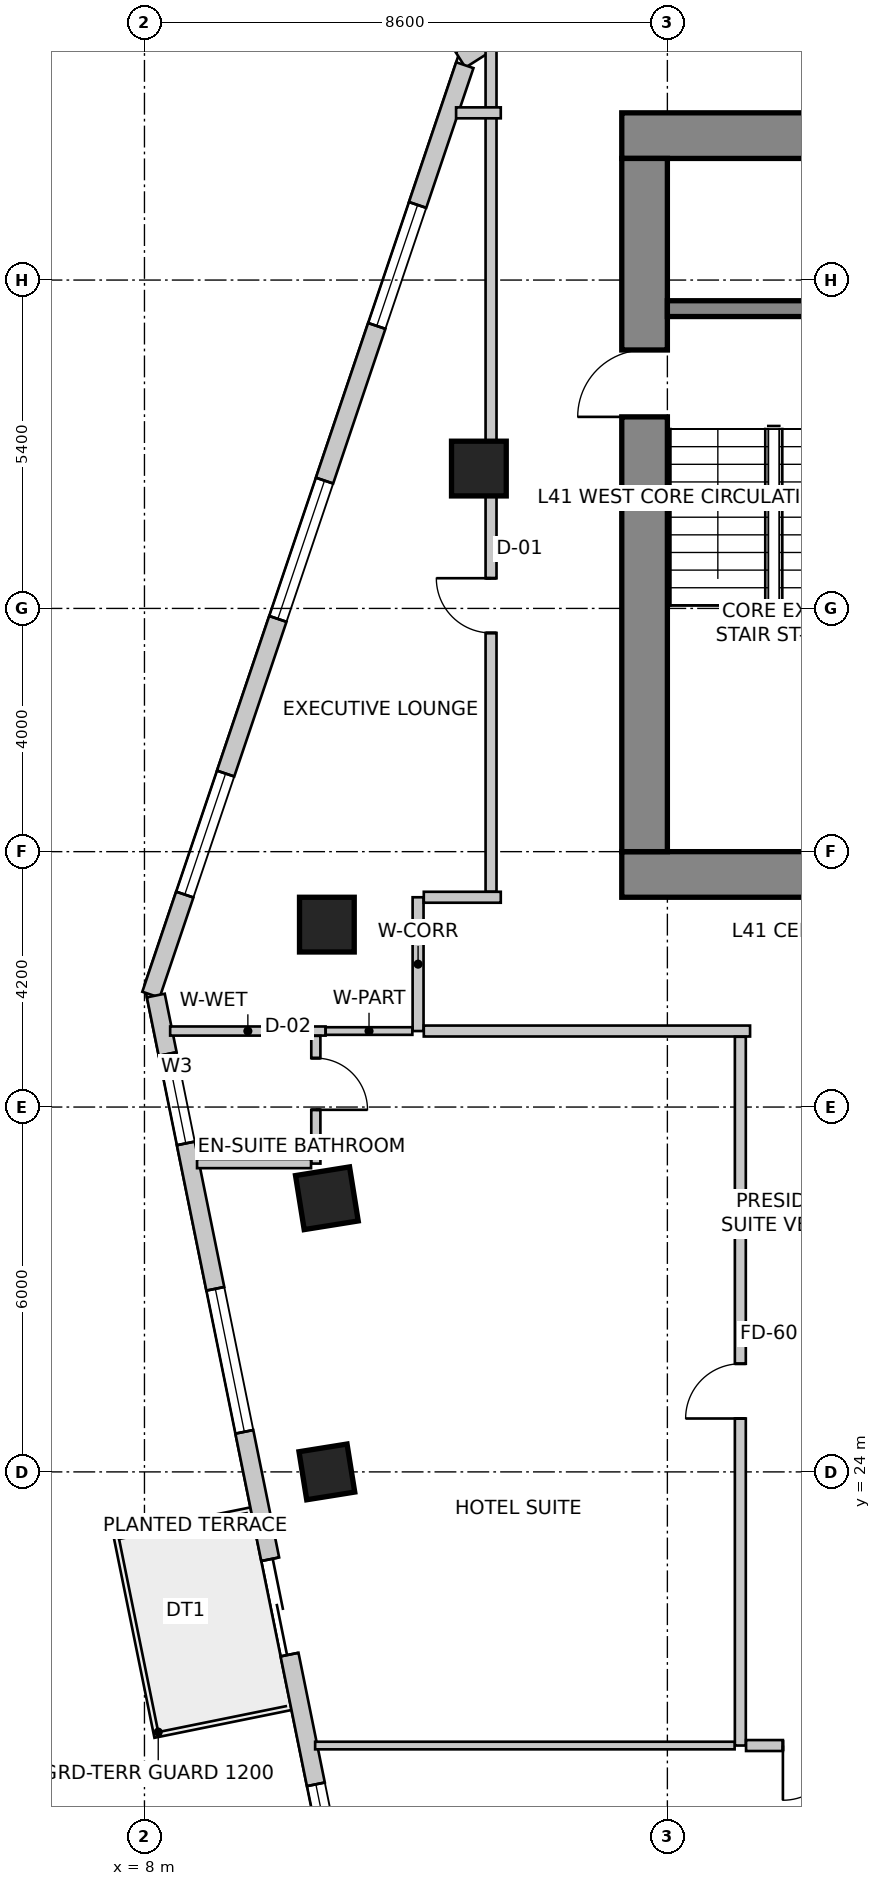
"""IFC4 building model, lengths in metres.
Left out: names, types, materials, properties, quantities, classifications, styles, units other than length and angle.
Written with IfcOpenShell. Run it as: python <this file> out.ifc"""

import sys

from ifc_helpers import new_model, si_unit, direction, frame, frame_2d, origin, origin_2d, place, context, subcontext, project, spatial, rectangle, extrude, source, transform, mapped, element, fill, save


model = new_model("IFC4")
c1 = context("Model", 3, precision=1e-05, world=origin(), true_north=direction((0.0, 1.0)))
c2 = subcontext(c1, "Body", "Model", "MODEL_VIEW")
j1 = project(units=[si_unit("LENGTHUNIT", "METRE"), si_unit("PLANEANGLEUNIT", "RADIAN")], contexts=[c1])
p1 = place(None, origin())
s1 = spatial("IfcSite", under=j1, at=p1, CompositionType="ELEMENT")
p2 = place(p1, origin())
s2 = spatial("IfcBuilding", under=s1, at=p2, CompositionType="ELEMENT")
p3 = place(p2, frame((0.0, 0.0, 164.6)))
s3 = spatial("IfcBuildingStorey", under=s2, at=p3, CompositionType="ELEMENT", Elevation=164.6)
p4 = place(p3, frame((15.85, 45.975, 0.0), z_axis=(0.0, 0.0, 1.0), x_axis=(1.0, 0.0, 0.0)))
e1 = element("IfcWall", 1, at=p4, inside=s3, PredefinedType="SHEAR", context=c2, shape_type="SweptSolid", body=[
    extrude(rectangle(XDim=15.9, YDim=0.75, at=frame_2d((7.95, 0.0))), origin(), (0.0, 0.0, 1.0), 3.6),
])
p5 = place(p3, frame((15.85, 33.825, 0.0), z_axis=(0.0, 0.0, 1.0), x_axis=(1.0, 0.0, 0.0)))
e2 = element("IfcWall", 2, at=p5, inside=s3, PredefinedType="SHEAR", context=c2, shape_type="SweptSolid", body=[
    extrude(rectangle(XDim=15.9, YDim=0.75, at=frame_2d((7.95, 0.0))), origin(), (0.0, 0.0, 1.0), 3.6),
])
m1 = source(origin(), c2, "Body", "SweptSolid", [
    extrude(rectangle(XDim=1.3, YDim=2.15, at=frame_2d((0.65, 1.075))), frame((0.0, 0.385, 0.0), z_axis=(0.0, -1.0, 0.0), x_axis=(1.0, 0.0, 0.0)), (0.0, 0.0, 1.0), 0.77),
])
p6 = place(p5, frame((10.08, 0.0, 0.0)))
e3 = element("IfcOpeningElement", 3, at=p6, cuts=e2, PredefinedType="OPENING", context=c2, shape_type="MappedRepresentation", body=[
    mapped(m1, transform((0.0, 0.0, 0.0), scale=1.0)),
])
p7 = place(p3, frame((16.225, 34.2, 0.0), z_axis=(0.0, 0.0, 1.0), x_axis=(0.0, 1.0, 0.0)))
e4 = element("IfcWall", 4, at=p7, inside=s3, PredefinedType="SHEAR", context=c2, shape_type="SweptSolid", body=[
    extrude(rectangle(XDim=11.4, YDim=0.75, at=frame_2d((5.7, 0.0))), origin(), (0.0, 0.0, 1.0), 3.6),
])
m2 = source(origin(), c2, "Body", "SweptSolid", [
    extrude(rectangle(XDim=1.1, YDim=2.15, at=frame_2d((0.55, 1.075))), frame((0.0, 0.385, 0.0), z_axis=(0.0, -1.0, 0.0), x_axis=(1.0, 0.0, 0.0)), (0.0, 0.0, 1.0), 0.77),
])
p8 = place(p7, frame((7.15, 0.0, 0.0)))
e5 = element("IfcOpeningElement", 5, at=p8, cuts=e4, PredefinedType="OPENING", context=c2, shape_type="MappedRepresentation", body=[
    mapped(m2, transform((0.0, 0.0, 0.0), scale=1.0)),
])
p9 = place(p3, frame((16.6, 43.13, 0.0), z_axis=(0.0, 0.0, 1.0), x_axis=(1.0, 0.0, 0.0)))
e6 = element("IfcWall", 6, at=p9, inside=s3, PredefinedType="SHEAR", context=c2, shape_type="SweptSolid", body=[
    extrude(rectangle(XDim=3.5, YDim=0.26, at=frame_2d((1.75, 0.0))), origin(), (0.0, 0.0, 1.0), 3.6),
])
m3 = source(origin(), c2, "Body", "SweptSolid", [
    extrude(rectangle(XDim=0.9, YDim=0.9, at=origin_2d()), origin(), (0.0, 0.0, 1.0), 3.6),
])
for number, where, z_axis, x_axis in (
    (7, (11.0, 33.0, 0.0), (0.0, 0.0, 1.0), (1.0, 0.0, 0.0)),
    (8, (13.5, 40.5, 0.0), (0.0, 0.0, 1.0), (1.0, 0.0, 0.0)),
    (9, (11.0, 28.5, 0.0), (0.0, 0.0, 1.0), (0.158, -0.987, 0.0)),
):
    element("IfcColumn", number, at=place(p3, frame(where, z_axis=z_axis, x_axis=x_axis)), inside=s3, PredefinedType="COLUMN", context=c2, shape_type="MappedRepresentation", body=[
        mapped(m3, transform((0.0, 0.0, 0.0), scale=1.0)),
    ])
m4 = source(origin(), c2, "Body", "SweptSolid", [
    extrude(rectangle(XDim=0.8, YDim=0.8, at=origin_2d()), origin(), (0.0, 0.0, 1.0), 3.6),
])
p10 = place(p3, frame((11.0, 24.0, 0.0), z_axis=(0.0, 0.0, 1.0), x_axis=(0.158158067254, -0.987413806751, 0.0)))
e10 = element("IfcColumn", 10, at=p10, inside=s3, PredefinedType="COLUMN", context=c2, shape_type="MappedRepresentation", body=[
    mapped(m4, transform((0.0, 0.0, 0.0), scale=1.0)),
])
p11 = place(p3, frame((21.875, 52.742, 0.0), z_axis=(0.0, 0.0, 1.0), x_axis=(-0.843662465249, -0.536873956092, 0.0)))
e11 = element("IfcWall", 11, at=p11, inside=s3, PredefinedType="SOLIDWALL", context=c2, shape_type="SweptSolid", body=[
    extrude(rectangle(XDim=10.284, YDim=0.3, at=frame_2d((5.142, 0.0))), origin(), (0.0, 0.0, 1.0), 3.35),
])
m5 = source(origin(), c2, "Body", "SweptSolid", [
    extrude(rectangle(XDim=2.4, YDim=2.2, at=frame_2d((1.2, 1.1))), frame((0.0, 0.16, 0.0), z_axis=(0.0, -1.0, 0.0), x_axis=(1.0, 0.0, 0.0)), (0.0, 0.0, 1.0), 0.32),
])
p12 = place(p11, frame((2.656, 0.0, 0.85)))
e12 = element("IfcOpeningElement", 12, at=p12, cuts=e11, PredefinedType="OPENING", context=c2, shape_type="MappedRepresentation", body=[
    mapped(m5, transform((0.0, 0.0, 0.0), scale=1.0)),
])
m6 = source(origin(), c2, "Body", "SweptSolid", [
    extrude(rectangle(XDim=1.5, YDim=1.8, at=frame_2d((0.75, 0.9))), frame((0.0, 0.16, 0.0), z_axis=(0.0, -1.0, 0.0), x_axis=(1.0, 0.0, 0.0)), (0.0, 0.0, 1.0), 0.32),
])
p13 = place(p11, frame((7.937, 0.0, 0.85)))
e13 = element("IfcOpeningElement", 13, at=p13, cuts=e11, PredefinedType="OPENING", context=c2, shape_type="MappedRepresentation", body=[
    mapped(m6, transform((0.0, 0.0, 0.0), scale=1.0)),
])
p14 = place(p3, frame((13.269, 47.134, 0.0), z_axis=(0.0, 0.0, 1.0), x_axis=(-0.319929773322, -0.947441259468, 0.0)))
e14 = element("IfcWall", 14, at=p14, inside=s3, PredefinedType="SOLIDWALL", context=c2, shape_type="SweptSolid", body=[
    extrude(rectangle(XDim=16.134, YDim=0.3, at=frame_2d((8.067, 0.0))), origin(), (0.0, 0.0, 1.0), 3.35),
])
m7 = source(origin(), c2, "Body", "SweptSolid", [
    extrude(rectangle(XDim=2.1, YDim=2.0, at=frame_2d((1.05, 1.0))), frame((0.0, 0.16, 0.0), z_axis=(0.0, -1.0, 0.0), x_axis=(1.0, 0.0, 0.0)), (0.0, 0.0, 1.0), 0.32),
])
p15 = place(p14, frame((2.426, 0.0, 0.85)))
e15 = element("IfcOpeningElement", 15, at=p15, cuts=e14, PredefinedType="OPENING", context=c2, shape_type="MappedRepresentation", body=[
    mapped(m7, transform((0.0, 0.0, 0.0), scale=1.0)),
])
p16 = place(p14, frame((7.211, 0.0, 0.85)))
e16 = element("IfcOpeningElement", 16, at=p16, cuts=e14, PredefinedType="OPENING", context=c2, shape_type="MappedRepresentation", body=[
    mapped(m5, transform((0.0, 0.0, 0.0), scale=1.0)),
])
p17 = place(p14, frame((12.296, 0.0, 0.85)))
e17 = element("IfcOpeningElement", 17, at=p17, cuts=e14, PredefinedType="OPENING", context=c2, shape_type="MappedRepresentation", body=[
    mapped(m7, transform((0.0, 0.0, 0.0), scale=1.0)),
])
p18 = place(p3, frame((8.187, 31.834, 0.0), z_axis=(0.0, 0.0, 1.0), x_axis=(0.198869838988, -0.980025911464, 0.0)))
e18 = element("IfcWall", 18, at=p18, inside=s3, PredefinedType="SOLIDWALL", context=c2, shape_type="SweptSolid", body=[
    extrude(rectangle(XDim=16.363, YDim=0.3, at=frame_2d((8.182, 0.0))), origin(), (0.0, 0.0, 1.0), 3.35),
])
m8 = source(origin(), c2, "Body", "SweptSolid", [
    extrude(rectangle(XDim=1.6, YDim=2.15, at=frame_2d((0.8, 1.075))), frame((0.0, 0.16, 0.0), z_axis=(0.0, -1.0, 0.0), x_axis=(1.0, 0.0, 0.0)), (0.0, 0.0, 1.0), 0.32),
])
p19 = place(p18, frame((9.459, 0.0, 0.0)))
e19 = element("IfcOpeningElement", 19, at=p19, cuts=e18, PredefinedType="OPENING", context=c2, shape_type="MappedRepresentation", body=[
    mapped(m8, transform((0.0, 0.0, 0.0), scale=1.0)),
])
p20 = place(p18, frame((0.981, 0.0, 0.85)))
e20 = element("IfcOpeningElement", 20, at=p20, cuts=e18, PredefinedType="OPENING", context=c2, shape_type="MappedRepresentation", body=[
    mapped(m6, transform((0.0, 0.0, 0.0), scale=1.0)),
])
p21 = place(p18, frame((4.921, 0.0, 0.85)))
e21 = element("IfcOpeningElement", 21, at=p21, cuts=e18, PredefinedType="OPENING", context=c2, shape_type="MappedRepresentation", body=[
    mapped(m5, transform((0.0, 0.0, 0.0), scale=1.0)),
])
p22 = place(p18, frame((13.236, 0.0, 0.85)))
e22 = element("IfcOpeningElement", 22, at=p22, cuts=e18, PredefinedType="OPENING", context=c2, shape_type="MappedRepresentation", body=[
    mapped(m5, transform((0.0, 0.0, 0.0), scale=1.0)),
])
p23 = place(p3, frame((12.5, 31.25, 0.0), z_axis=(0.0, 0.0, 1.0), x_axis=(0.0, 1.0, 0.0)))
e23 = element("IfcWall", 23, at=p23, inside=s3, PredefinedType="PARTITIONING", context=c2, shape_type="SweptSolid", body=[
    extrude(rectangle(XDim=2.2, YDim=0.18, at=frame_2d((1.1, 0.0))), origin(), (0.0, 0.0, 1.0), 3.034),
])
p24 = place(p3, frame((12.594, 33.45, 0.0), z_axis=(0.0, 0.0, 1.0), x_axis=(1.0, 0.0, 0.0)))
e24 = element("IfcWall", 24, at=p24, inside=s3, PredefinedType="PARTITIONING", context=c2, shape_type="SweptSolid", body=[
    extrude(rectangle(XDim=1.266, YDim=0.18, at=frame_2d((0.633, 0.0))), origin(), (0.0, 0.0, 1.0), 3.35),
])
p25 = place(p3, frame((17.96, 31.25, 0.0), z_axis=(0.0, 0.0, 1.0), x_axis=(-1.0, 0.0, 0.0)))
e25 = element("IfcWall", 25, at=p25, inside=s3, PredefinedType="PARTITIONING", context=c2, shape_type="SweptSolid", body=[
    extrude(rectangle(XDim=5.366, YDim=0.18, at=frame_2d((2.683, 0.0))), origin(), (0.0, 0.0, 1.0), 3.034),
])
p26 = place(p3, frame((13.7, 33.544, 0.0), z_axis=(0.0, 0.0, 1.0), x_axis=(0.0, 1.0, 0.0)))
e26 = element("IfcWall", 26, at=p26, inside=s3, PredefinedType="PARTITIONING", context=c2, shape_type="SweptSolid", body=[
    extrude(rectangle(XDim=13.86, YDim=0.18, at=frame_2d((6.93, 0.0))), origin(), (0.0, 0.0, 1.0), 2.492),
])
m9 = source(origin(), c2, "Body", "SweptSolid", [
    extrude(rectangle(XDim=0.9, YDim=2.15, at=frame_2d((0.45, 1.075))), frame((0.0, 0.1, 0.0), z_axis=(0.0, -1.0, 0.0), x_axis=(1.0, 0.0, 0.0)), (0.0, 0.0, 1.0), 0.2),
])
p27 = place(p26, frame((4.253, 0.0, 0.0)))
e27 = element("IfcOpeningElement", 27, at=p27, cuts=e26, PredefinedType="OPENING", context=c2, shape_type="MappedRepresentation", body=[
    mapped(m9, transform((0.0, 0.0, 0.0), scale=1.0)),
])
p28 = place(p3, frame((13.86, 46.35, 0.0), z_axis=(0.0, 0.0, 1.0), x_axis=(-1.0, 0.0, 0.0)))
e28 = element("IfcWall", 28, at=p28, inside=s3, PredefinedType="PARTITIONING", context=c2, shape_type="SweptSolid", body=[
    extrude(rectangle(XDim=0.735, YDim=0.18, at=frame_2d((0.367, 0.0))), origin(), (0.0, 0.0, 1.0), 3.35),
])
p29 = place(p3, frame((10.979, 31.25, 0.0), z_axis=(0.0, 0.0, 1.0), x_axis=(-1.0, 0.0, 0.0)))
e29 = element("IfcWall", 29, at=p29, inside=s3, PredefinedType="PARTITIONING", context=c2, shape_type="SweptSolid", body=[
    extrude(rectangle(XDim=2.556, YDim=0.15, at=frame_2d((1.278, 0.0))), origin(), (0.0, 0.0, 1.0), 2.492),
])
p30 = place(p3, frame((12.406, 31.25, 0.0), z_axis=(0.0, 0.0, 1.0), x_axis=(-1.0, 0.0, 0.0)))
e30 = element("IfcWall", 30, at=p30, inside=s3, PredefinedType="PARTITIONING", context=c2, shape_type="SweptSolid", body=[
    extrude(rectangle(XDim=1.426, YDim=0.125, at=frame_2d((0.713, 0.0))), origin(), (0.0, 0.0, 1.0), 2.492),
])
p31 = place(p3, frame((17.8, 19.5, 0.0), z_axis=(0.0, 0.0, 1.0), x_axis=(0.0, 1.0, 0.0)))
e31 = element("IfcWall", 31, at=p31, inside=s3, PredefinedType="PARTITIONING", context=c2, shape_type="SweptSolid", body=[
    extrude(rectangle(XDim=11.656, YDim=0.18, at=frame_2d((5.828, 0.0))), origin(), (0.0, 0.0, 1.0), 2.803),
])
p32 = place(p31, frame((5.378, 0.0, 0.0)))
e32 = element("IfcOpeningElement", 32, at=p32, cuts=e31, PredefinedType="OPENING", context=c2, shape_type="MappedRepresentation", body=[
    mapped(m9, transform((0.0, 0.0, 0.0), scale=1.0)),
])
p33 = place(p3, frame((20.006, 19.5, 0.0), z_axis=(0.0, 0.0, 1.0), x_axis=(-1.0, 0.0, 0.0)))
e33 = element("IfcWall", 33, at=p33, inside=s3, PredefinedType="PARTITIONING", context=c2, shape_type="SweptSolid", body=[
    extrude(rectangle(XDim=2.112, YDim=0.18, at=frame_2d((1.056, 0.0))), origin(), (0.0, 0.0, 1.0), 3.35),
])
p34 = place(p33, frame((0.606, 0.0, 0.0)))
e34 = element("IfcOpeningElement", 34, at=p34, cuts=e33, PredefinedType="OPENING", context=c2, shape_type="MappedRepresentation", body=[
    mapped(m9, transform((0.0, 0.0, 0.0), scale=1.0)),
])
p35 = place(p3, frame((10.819, 31.171, 0.0), z_axis=(0.0, 0.0, 1.0), x_axis=(0.0, -1.0, 0.0)))
e35 = element("IfcWall", 35, at=p35, inside=s3, PredefinedType="PARTITIONING", context=c2, shape_type="SweptSolid", body=[
    extrude(rectangle(XDim=2.101, YDim=0.15, at=frame_2d((1.05, 0.0))), origin(), (0.0, 0.0, 1.0), 2.492),
])
m10 = source(origin(), c2, "Body", "SweptSolid", [
    extrude(rectangle(XDim=0.85, YDim=2.15, at=frame_2d((0.425, 1.075))), frame((0.0, 0.085, 0.0), z_axis=(0.0, -1.0, 0.0), x_axis=(1.0, 0.0, 0.0)), (0.0, 0.0, 1.0), 0.17),
])
p36 = place(p35, frame((0.366, 0.0, 0.0)))
e36 = element("IfcOpeningElement", 36, at=p36, cuts=e35, PredefinedType="OPENING", context=c2, shape_type="MappedRepresentation", body=[
    mapped(m10, transform((0.0, 0.0, 0.0), scale=1.0)),
])
p37 = place(p3, frame((10.74, 29.07, 0.0), z_axis=(0.0, 0.0, 1.0), x_axis=(-1.0, 0.0, 0.0)))
e37 = element("IfcWall", 37, at=p37, inside=s3, PredefinedType="PARTITIONING", context=c2, shape_type="SweptSolid", body=[
    extrude(rectangle(XDim=1.875, YDim=0.15, at=frame_2d((0.937, 0.0))), origin(), (0.0, 0.0, 1.0), 3.35),
])
p38 = place(p3, frame((17.706, 19.5, 0.0), z_axis=(0.0, 0.0, 1.0), x_axis=(-1.0, 0.0, 0.0)))
e38 = element("IfcWall", 38, at=p38, inside=s3, PredefinedType="PARTITIONING", context=c2, shape_type="SweptSolid", body=[
    extrude(rectangle(XDim=6.899, YDim=0.125, at=frame_2d((3.45, 0.0))), origin(), (0.0, 0.0, 1.0), 3.35),
])
m11 = source(origin(), c2, "Body", "SweptSolid", [
    extrude(rectangle(XDim=2.1, YDim=2.0, at=frame_2d((1.05, 1.0))), frame((0.0, -0.015, 0.0), z_axis=(0.0, -1.0, 0.0), x_axis=(1.0, 0.0, 0.0)), (0.0, 0.0, 1.0), 0.06),
])
p39 = place(p15, origin())
e39 = element("IfcWindow", 39, at=p39, inside=s3, PartitioningType="SINGLE_PANEL", PredefinedType="WINDOW", context=c2, shape_type="MappedRepresentation", body=[
    mapped(m11, transform((0.0, 0.0, 0.0), scale=1.0)),
])
fill(e15, e39)
m12 = source(origin(), c2, "Body", "SweptSolid", [
    extrude(rectangle(XDim=2.4, YDim=2.2, at=frame_2d((1.2, 1.1))), frame((0.0, -0.015, 0.0), z_axis=(0.0, -1.0, 0.0), x_axis=(1.0, 0.0, 0.0)), (0.0, 0.0, 1.0), 0.06),
])
p40 = place(p16, origin())
e40 = element("IfcWindow", 40, at=p40, inside=s3, PartitioningType="SINGLE_PANEL", PredefinedType="WINDOW", context=c2, shape_type="MappedRepresentation", body=[
    mapped(m12, transform((0.0, 0.0, 0.0), scale=1.0)),
])
fill(e16, e40)
p41 = place(p17, origin())
e41 = element("IfcWindow", 41, at=p41, inside=s3, PartitioningType="SINGLE_PANEL", PredefinedType="WINDOW", context=c2, shape_type="MappedRepresentation", body=[
    mapped(m11, transform((0.0, 0.0, 0.0), scale=1.0)),
])
fill(e17, e41)
m13 = source(origin(), c2, "Body", "SweptSolid", [
    extrude(rectangle(XDim=1.6, YDim=2.15, at=frame_2d((0.8, 1.075))), frame((0.0, 0.025, 0.0), z_axis=(0.0, -1.0, 0.0), x_axis=(1.0, 0.0, 0.0)), (0.0, 0.0, 1.0), 0.05),
])
p42 = place(p19, origin())
e42 = element("IfcDoor", 42, at=p42, inside=s3, OperationType="DOUBLE_DOOR_SLIDING", PredefinedType="DOOR", context=c2, shape_type="MappedRepresentation", body=[
    mapped(m13, transform((0.0, 0.0, 0.0), scale=1.0)),
])
fill(e19, e42)
m14 = source(origin(), c2, "Body", "SweptSolid", [
    extrude(rectangle(XDim=1.5, YDim=1.8, at=frame_2d((0.75, 0.9))), frame((0.0, -0.015, 0.0), z_axis=(0.0, -1.0, 0.0), x_axis=(1.0, 0.0, 0.0)), (0.0, 0.0, 1.0), 0.06),
])
p43 = place(p20, origin())
e43 = element("IfcWindow", 43, at=p43, inside=s3, PartitioningType="SINGLE_PANEL", PredefinedType="WINDOW", context=c2, shape_type="MappedRepresentation", body=[
    mapped(m14, transform((0.0, 0.0, 0.0), scale=1.0)),
])
fill(e20, e43)
p44 = place(p21, origin())
e44 = element("IfcWindow", 44, at=p44, inside=s3, PartitioningType="SINGLE_PANEL", PredefinedType="WINDOW", context=c2, shape_type="MappedRepresentation", body=[
    mapped(m12, transform((0.0, 0.0, 0.0), scale=1.0)),
])
fill(e21, e44)
p45 = place(p22, origin())
e45 = element("IfcWindow", 45, at=p45, inside=s3, PartitioningType="SINGLE_PANEL", PredefinedType="WINDOW", context=c2, shape_type="MappedRepresentation", body=[
    mapped(m12, transform((0.0, 0.0, 0.0), scale=1.0)),
])
fill(e22, e45)
m15 = source(origin(), c2, "Body", "SweptSolid", [
    extrude(rectangle(XDim=1.1, YDim=2.15, at=frame_2d((0.55, 1.075))), frame((0.0, 0.025, 0.0), z_axis=(0.0, -1.0, 0.0), x_axis=(1.0, 0.0, 0.0)), (0.0, 0.0, 1.0), 0.05),
])
p46 = place(p8, origin())
e46 = element("IfcDoor", 46, at=p46, inside=s3, OperationType="SINGLE_SWING_LEFT", PredefinedType="DOOR", context=c2, shape_type="MappedRepresentation", body=[
    mapped(m15, transform((0.0, 0.0, 0.0), scale=1.0)),
])
fill(e5, e46)
m16 = source(origin(), c2, "Body", "SweptSolid", [
    extrude(rectangle(XDim=0.9, YDim=2.15, at=frame_2d((0.45, 1.075))), frame((0.0, 0.025, 0.0), z_axis=(0.0, -1.0, 0.0), x_axis=(1.0, 0.0, 0.0)), (0.0, 0.0, 1.0), 0.05),
])
p47 = place(p27, origin())
e47 = element("IfcDoor", 47, at=p47, inside=s3, OperationType="SINGLE_SWING_RIGHT", PredefinedType="DOOR", context=c2, shape_type="MappedRepresentation", body=[
    mapped(m16, transform((0.0, 0.0, 0.0), scale=1.0)),
])
fill(e27, e47)
m17 = source(origin(), c2, "Body", "SweptSolid", [
    extrude(rectangle(XDim=0.85, YDim=2.15, at=frame_2d((0.425, 1.075))), frame((0.0, 0.025, 0.0), z_axis=(0.0, -1.0, 0.0), x_axis=(1.0, 0.0, 0.0)), (0.0, 0.0, 1.0), 0.05),
])
p48 = place(p36, origin())
e48 = element("IfcDoor", 48, at=p48, inside=s3, OperationType="SINGLE_SWING_RIGHT", PredefinedType="DOOR", context=c2, shape_type="MappedRepresentation", body=[
    mapped(m17, transform((0.0, 0.0, 0.0), scale=1.0)),
])
fill(e36, e48)
m18 = source(origin(), c2, "Body", "SweptSolid", [
    extrude(rectangle(XDim=0.9, YDim=2.15, at=frame_2d((0.45, 1.075))), frame((0.0, 0.025, 0.0), z_axis=(0.0, -1.0, 0.0), x_axis=(1.0, 0.0, 0.0)), (0.0, 0.0, 1.0), 0.05),
])
p49 = place(p32, origin())
e49 = element("IfcDoor", 49, at=p49, inside=s3, OperationType="SINGLE_SWING_LEFT", PredefinedType="DOOR", context=c2, shape_type="MappedRepresentation", body=[
    mapped(m18, transform((0.0, 0.0, 0.0), scale=1.0)),
])
fill(e32, e49)
p50 = place(p34, origin())
e50 = element("IfcDoor", 50, at=p50, inside=s3, OperationType="SINGLE_SWING_RIGHT", PredefinedType="DOOR", context=c2, shape_type="MappedRepresentation", body=[
    mapped(m16, transform((0.0, 0.0, 0.0), scale=1.0)),
])
fill(e34, e50)
save(model, sys.argv[1])
